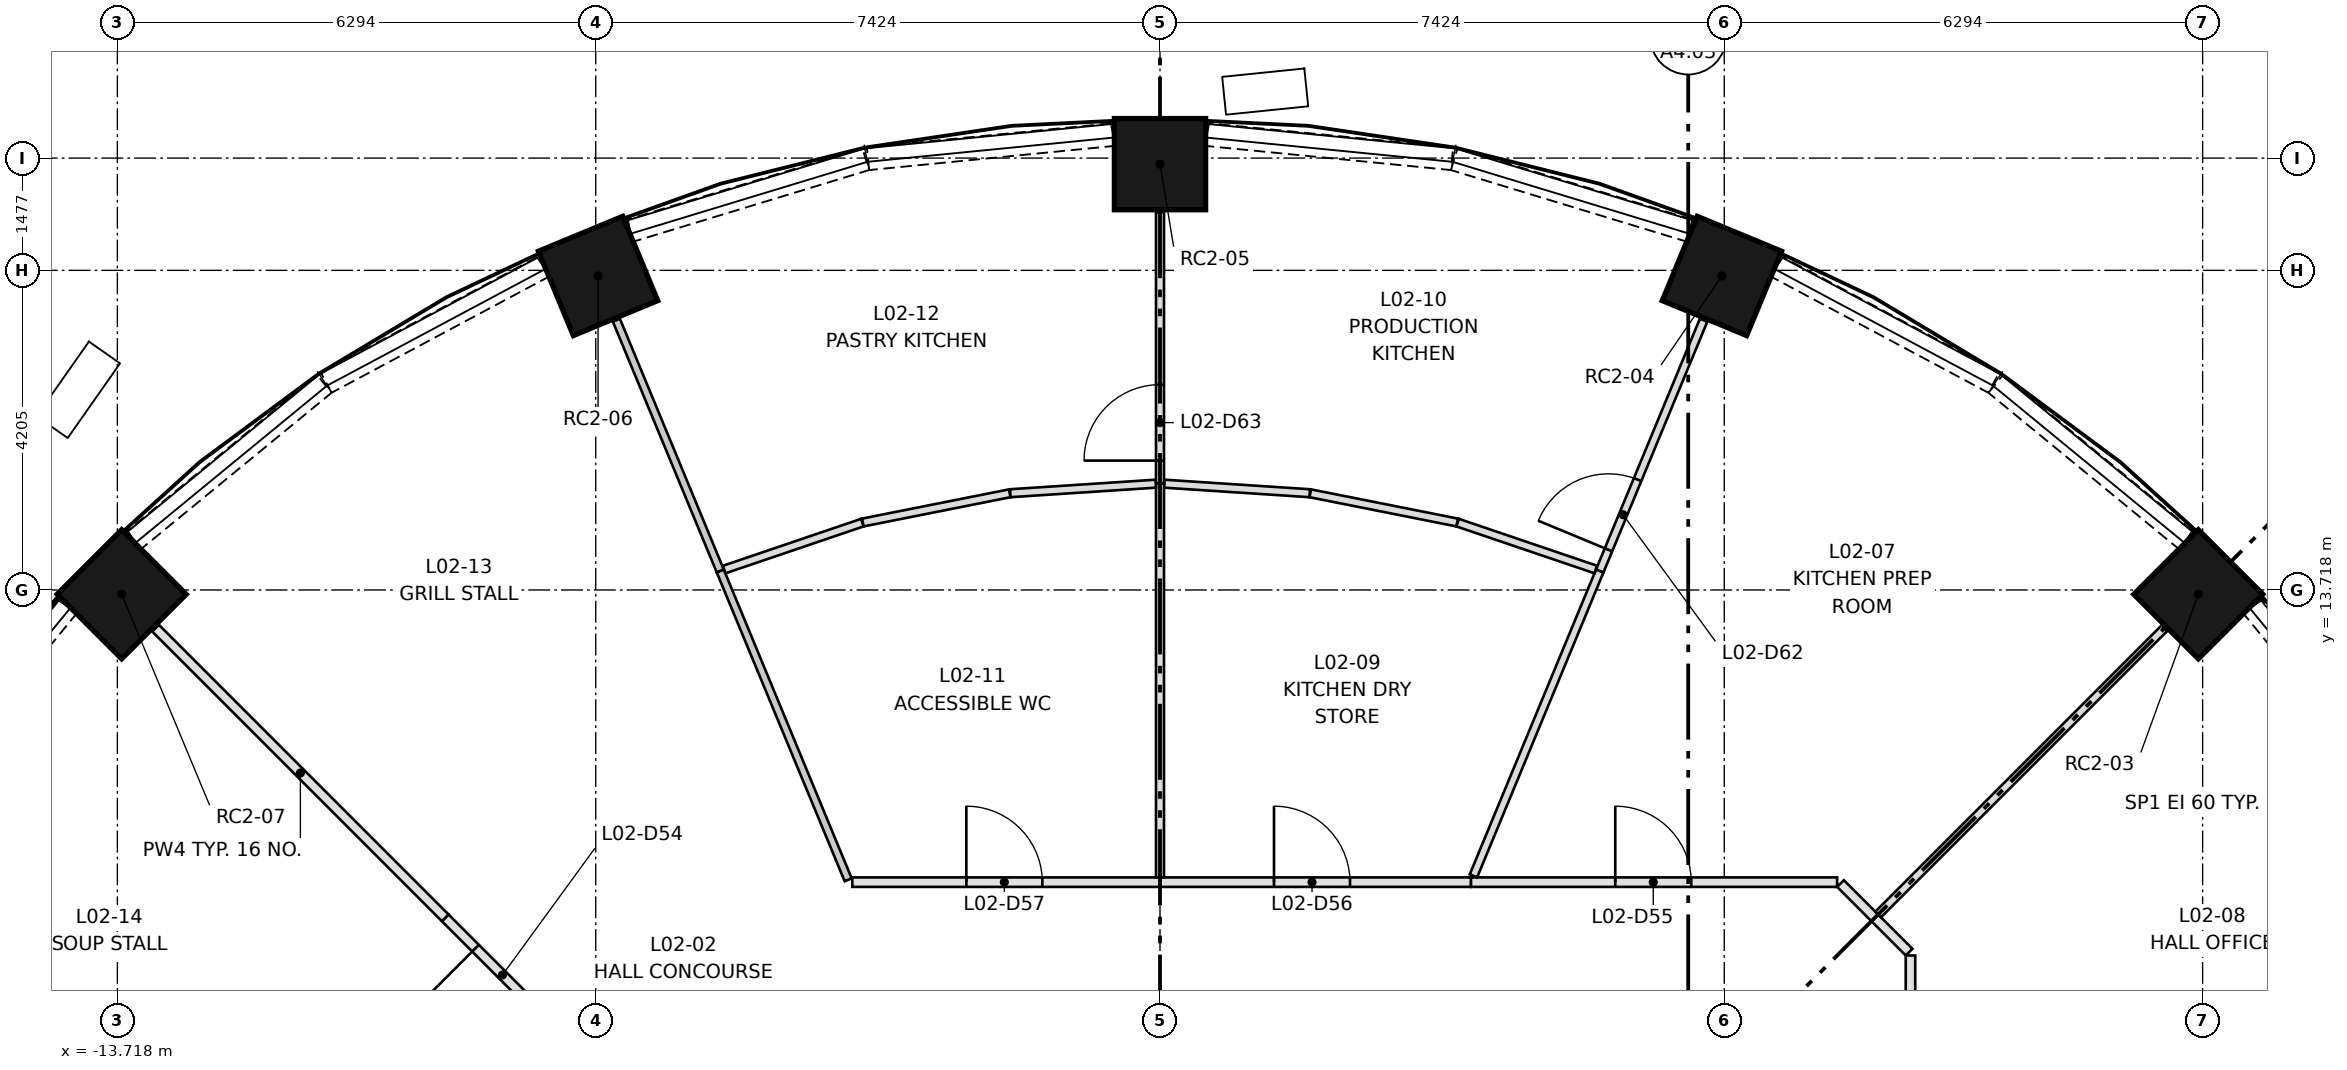
"""IFC4 building model, lengths in metres.
Left out: names, types, materials, properties, quantities, classifications, styles, units other than length and angle.
Written with IfcOpenShell. Run it as: python <this file> out.ifc"""

import sys

from ifc_helpers import new_model, si_unit, direction, frame, frame_2d, origin, origin_2d, place, context, subcontext, project, spatial, rectangle, extrude, element, fill, save


model = new_model("IFC4")
c1 = context("Model", 3, precision=1e-05, world=origin(), true_north=direction((0.0, 1.0)))
c2 = subcontext(c1, "Body", "Model", "MODEL_VIEW")
j1 = project(units=[si_unit("LENGTHUNIT", "METRE"), si_unit("PLANEANGLEUNIT", "RADIAN")], contexts=[c1])
p1 = place(None, origin())
s1 = spatial("IfcSite", under=j1, at=p1, CompositionType="ELEMENT")
p2 = place(p1, origin())
s2 = spatial("IfcBuilding", under=s1, at=p2, CompositionType="ELEMENT")
p3 = place(p2, frame((0.0, 0.0, 9.9)))
s3 = spatial("IfcBuildingStorey", under=s2, at=p3, CompositionType="ELEMENT", Elevation=9.9)
for number, where, z_axis, x_axis in (
    (1, (13.661, 13.661, 0.0), (0.0, 0.0, 1.0), (0.707, 0.707, 0.0)),
    (2, (7.394, 17.849, 0.0), (0.0, 0.0, 1.0), (0.383, 0.924, 0.0)),
    (3, (0.0, 19.32, 0.0), (0.0, 0.0, 1.0), (0.0, 1.0, 0.0)),
    (4, (-7.394, 17.849, 0.0), (0.0, 0.0, 1.0), (-0.383, 0.924, 0.0)),
    (5, (-13.661, 13.661, 0.0), (0.0, 0.0, 1.0), (-0.707, 0.707, 0.0)),
):
    element("IfcColumn", number, at=place(p3, frame(where, z_axis=z_axis, x_axis=x_axis)), inside=s3, PredefinedType="COLUMN", context=c2, shape_type="SweptSolid", body=[
        extrude(rectangle(XDim=1.2, YDim=1.2, at=origin_2d()), origin(), (0.0, 0.0, 1.0), 4.5),
    ])
for number, where, z_axis, x_axis in (
    (6, (16.428, 10.995, 0.0), (0.0, 0.0, 1.0), (-0.634, 0.773, 0.0)),
    (7, (13.503, 14.371, 0.0), (0.0, 0.0, 1.0), (-0.773, 0.634, 0.0)),
):
    element("IfcWall", number, at=place(p3, frame(where, z_axis=z_axis, x_axis=x_axis)), inside=s3, PredefinedType="SOLIDWALL", context=c2, shape_type="SweptSolid", body=[
        extrude(rectangle(XDim=3.245, YDim=0.3, at=frame_2d((1.623, 0.0))), origin(), (0.0, 0.0, 1.0), 0.45),
    ])
p4 = place(p3, frame((10.97, 16.445, 0.0), z_axis=(0.0, 0.0, 1.0), x_axis=(-0.882015257196, 0.471220846392, 0.0)))
e8 = element("IfcWall", 8, at=p4, inside=s3, PredefinedType="SOLIDWALL", context=c2, shape_type="SweptSolid", body=[
    extrude(rectangle(XDim=3.244, YDim=0.3, at=frame_2d((1.622, 0.0))), origin(), (0.0, 0.0, 1.0), 0.45),
])
p5 = place(p3, frame((6.976, 18.443, 0.0), z_axis=(0.0, 0.0, 1.0), x_axis=(-0.95689962518, 0.290418848098, 0.0)))
e9 = element("IfcWall", 9, at=p5, inside=s3, PredefinedType="SOLIDWALL", context=c2, shape_type="SweptSolid", body=[
    extrude(rectangle(XDim=3.244, YDim=0.3, at=frame_2d((1.622, 0.0))), origin(), (0.0, 0.0, 1.0), 0.45),
])
for number, where, z_axis, x_axis in (
    (10, (3.842, 19.392, 0.0), (0.0, 0.0, 1.0), (-0.995, 0.098, 0.0)),
    (11, (-0.613, 19.709, 0.0), (0.0, 0.0, 1.0), (-0.995, -0.098, 0.0)),
):
    element("IfcWall", number, at=place(p3, frame(where, z_axis=z_axis, x_axis=x_axis)), inside=s3, PredefinedType="SOLIDWALL", context=c2, shape_type="SweptSolid", body=[
        extrude(rectangle(XDim=3.245, YDim=0.3, at=frame_2d((1.623, 0.0))), origin(), (0.0, 0.0, 1.0), 0.45),
    ])
p6 = place(p3, frame((-3.871, 19.385, 0.0), z_axis=(0.0, 0.0, 1.0), x_axis=(-0.95689962518, -0.290418848098, 0.0)))
e12 = element("IfcWall", 12, at=p6, inside=s3, PredefinedType="SOLIDWALL", context=c2, shape_type="SweptSolid", body=[
    extrude(rectangle(XDim=3.244, YDim=0.3, at=frame_2d((1.622, 0.0))), origin(), (0.0, 0.0, 1.0), 0.45),
])
p7 = place(p3, frame((-8.108, 17.974, 0.0), z_axis=(0.0, 0.0, 1.0), x_axis=(-0.882015257196, -0.471220846392, 0.0)))
e13 = element("IfcWall", 13, at=p7, inside=s3, PredefinedType="SOLIDWALL", context=c2, shape_type="SweptSolid", body=[
    extrude(rectangle(XDim=3.244, YDim=0.3, at=frame_2d((1.622, 0.0))), origin(), (0.0, 0.0, 1.0), 0.45),
])
for number, where, z_axis, x_axis in (
    (14, (-10.995, 16.428, 0.0), (0.0, 0.0, 1.0), (-0.773, -0.634, 0.0)),
    (15, (-14.371, 13.503, 0.0), (0.0, 0.0, 1.0), (-0.634, -0.773, 0.0)),
):
    element("IfcWall", number, at=place(p3, frame(where, z_axis=z_axis, x_axis=x_axis)), inside=s3, PredefinedType="SOLIDWALL", context=c2, shape_type="SweptSolid", body=[
        extrude(rectangle(XDim=3.245, YDim=0.3, at=frame_2d((1.623, 0.0))), origin(), (0.0, 0.0, 1.0), 0.45),
    ])
p8 = place(p3, frame((9.405, 9.405, 0.0), z_axis=(0.0, 0.0, 1.0), x_axis=(0.707106781187, -0.707106781187, 0.0)))
e16 = element("IfcWall", 16, at=p8, inside=s3, PredefinedType="PARTITIONING", context=c2, shape_type="SweptSolid", body=[
    extrude(rectangle(XDim=0.638, YDim=0.125, at=frame_2d((0.319, 0.0))), origin(), (0.0, 0.0, 1.0), 4.1),
])
p9 = place(p3, frame((9.874, 8.909, 0.0), z_axis=(0.0, 0.0, 1.0), x_axis=(0.0, -1.0, 0.0)))
e17 = element("IfcWall", 17, at=p9, inside=s3, PredefinedType="PARTITIONING", context=c2, shape_type="SweptSolid", body=[
    extrude(rectangle(XDim=4.819, YDim=0.125, at=frame_2d((2.41, 0.0))), origin(), (0.0, 0.0, 1.0), 4.1),
])
p10 = place(p9, frame((1.9, 0.0, 0.0)))
e18 = element("IfcOpeningElement", 18, at=p10, cuts=e17, PredefinedType="OPENING", context=c2, shape_type="SweptSolid", body=[
    extrude(rectangle(XDim=1.0, YDim=2.1, at=frame_2d((0.5, 1.05))), frame((0.0, 0.073, 0.0), z_axis=(0.0, -1.0, 0.0), x_axis=(1.0, 0.0, 0.0)), (0.0, 0.0, 1.0), 0.145),
])
p11 = place(p3, frame((-7.874, 7.874, 0.0), z_axis=(0.0, 0.0, 1.0), x_axis=(-0.707106781187, 0.707106781187, 0.0)))
e19 = element("IfcWall", 19, at=p11, inside=s3, PredefinedType="PARTITIONING", context=c2, shape_type="SweptSolid", body=[
    extrude(rectangle(XDim=2.165, YDim=0.125, at=frame_2d((1.082, 0.0))), origin(), (0.0, 0.0, 1.0), 4.1),
])
p12 = place(p11, frame((0.6, 0.0, 0.0)))
e20 = element("IfcOpeningElement", 20, at=p12, cuts=e19, PredefinedType="OPENING", context=c2, shape_type="SweptSolid", body=[
    extrude(rectangle(XDim=1.0, YDim=2.1, at=frame_2d((0.5, 1.05))), frame((0.0, 0.073, 0.0), z_axis=(0.0, -1.0, 0.0), x_axis=(1.0, 0.0, 0.0)), (0.0, 0.0, 1.0), 0.145),
])
p13 = place(p3, frame((4.09, 9.874, 0.0), z_axis=(0.0, 0.0, 1.0), x_axis=(1.0, 0.0, 0.0)))
e21 = element("IfcWall", 21, at=p13, inside=s3, PredefinedType="PARTITIONING", context=c2, shape_type="SweptSolid", body=[
    extrude(rectangle(XDim=4.819, YDim=0.125, at=frame_2d((2.41, 0.0))), origin(), (0.0, 0.0, 1.0), 4.1),
])
p14 = place(p13, frame((1.9, 0.0, 0.0)))
e22 = element("IfcOpeningElement", 22, at=p14, cuts=e21, PredefinedType="OPENING", context=c2, shape_type="SweptSolid", body=[
    extrude(rectangle(XDim=1.0, YDim=2.1, at=frame_2d((0.5, 1.05))), frame((0.0, 0.073, 0.0), z_axis=(0.0, -1.0, 0.0), x_axis=(1.0, 0.0, 0.0)), (0.0, 0.0, 1.0), 0.145),
])
p15 = place(p3, frame((8.953, 9.856, 0.0), z_axis=(0.0, 0.0, 1.0), x_axis=(0.707106781187, -0.707106781187, 0.0)))
e23 = element("IfcWall", 23, at=p15, inside=s3, PredefinedType="PARTITIONING", context=c2, shape_type="SweptSolid", body=[
    extrude(rectangle(XDim=0.638, YDim=0.125, at=frame_2d((0.319, 0.0))), origin(), (0.0, 0.0, 1.0), 4.1),
])
p16 = place(p3, frame((0.0, 9.874, 0.0), z_axis=(0.0, 0.0, 1.0), x_axis=(1.0, 0.0, 0.0)))
e24 = element("IfcWall", 24, at=p16, inside=s3, PredefinedType="PARTITIONING", context=c2, shape_type="SweptSolid", body=[
    extrude(rectangle(XDim=4.09, YDim=0.125, at=frame_2d((2.045, 0.0))), origin(), (0.0, 0.0, 1.0), 4.1),
])
p17 = place(p16, frame((1.5, 0.0, 0.0)))
e25 = element("IfcOpeningElement", 25, at=p17, cuts=e24, PredefinedType="OPENING", context=c2, shape_type="SweptSolid", body=[
    extrude(rectangle(XDim=1.0, YDim=2.1, at=frame_2d((0.5, 1.05))), frame((0.0, 0.073, 0.0), z_axis=(0.0, -1.0, 0.0), x_axis=(1.0, 0.0, 0.0)), (0.0, 0.0, 1.0), 0.145),
])
p18 = place(p3, frame((-4.048, 9.874, 0.0), z_axis=(0.0, 0.0, 1.0), x_axis=(1.0, 0.0, 0.0)))
e26 = element("IfcWall", 26, at=p18, inside=s3, PredefinedType="PARTITIONING", context=c2, shape_type="SweptSolid", body=[
    extrude(rectangle(XDim=4.048, YDim=0.125, at=frame_2d((2.024, 0.0))), origin(), (0.0, 0.0, 1.0), 4.1),
])
p19 = place(p18, frame((1.5, 0.0, 0.0)))
e27 = element("IfcOpeningElement", 27, at=p19, cuts=e26, PredefinedType="OPENING", context=c2, shape_type="SweptSolid", body=[
    extrude(rectangle(XDim=1.0, YDim=2.1, at=frame_2d((0.5, 1.05))), frame((0.0, 0.073, 0.0), z_axis=(0.0, -1.0, 0.0), x_axis=(1.0, 0.0, 0.0)), (0.0, 0.0, 1.0), 0.145),
])
p20 = place(p3, frame((13.216, 13.216, 0.0), z_axis=(0.0, 0.0, 1.0), x_axis=(-0.707106781187, -0.707106781187, 0.0)))
e28 = element("IfcWall", 28, at=p20, inside=s3, PredefinedType="PARTITIONING", context=c2, shape_type="SweptSolid", body=[
    extrude(rectangle(XDim=5.327, YDim=0.105, at=frame_2d((2.664, 0.0))), origin(), (0.0, 0.0, 1.0), 4.1),
])
p21 = place(p3, frame((4.124, 9.957, 0.0), z_axis=(0.0, 0.0, 1.0), x_axis=(0.382702629741, 0.923871580464, 0.0)))
e29 = element("IfcWall", 29, at=p21, inside=s3, PredefinedType="PARTITIONING", context=c2, shape_type="SweptSolid", body=[
    extrude(rectangle(XDim=4.343, YDim=0.105, at=frame_2d((2.171, 0.0))), origin(), (0.0, 0.0, 1.0), 4.1),
])
p22 = place(p3, frame((5.786, 13.969, 0.0), z_axis=(0.0, 0.0, 1.0), x_axis=(0.382681959822, 0.923880142457, 0.0)))
e30 = element("IfcWall", 30, at=p22, inside=s3, PredefinedType="PARTITIONING", context=c2, shape_type="SweptSolid", body=[
    extrude(rectangle(XDim=3.57, YDim=0.105, at=frame_2d((1.785, 0.0))), origin(), (0.0, 0.0, 1.0), 4.1),
])
p23 = place(p22, frame((0.3, 0.0, 0.0)))
e31 = element("IfcOpeningElement", 31, at=p23, cuts=e30, PredefinedType="OPENING", context=c2, shape_type="SweptSolid", body=[
    extrude(rectangle(XDim=1.0, YDim=2.1, at=frame_2d((0.5, 1.05))), frame((0.0, 0.062, 0.0), z_axis=(0.0, -1.0, 0.0), x_axis=(1.0, 0.0, 0.0)), (0.0, 0.0, 1.0), 0.125),
])
p24 = place(p3, frame((0.056, 15.116, 0.0), z_axis=(0.0, 0.0, 1.0), x_axis=(0.997858311014, -0.06541246931, 0.0)))
e32 = element("IfcWall", 32, at=p24, inside=s3, PredefinedType="PARTITIONING", context=c2, shape_type="SweptSolid", body=[
    extrude(rectangle(XDim=1.918, YDim=0.105, at=frame_2d((0.959, 0.0))), origin(), (0.0, 0.0, 1.0), 4.1),
])
p25 = place(p3, frame((1.977, 14.99, 0.0), z_axis=(0.0, 0.0, 1.0), x_axis=(0.980780283586, -0.195115441032, 0.0)))
e33 = element("IfcWall", 33, at=p25, inside=s3, PredefinedType="PARTITIONING", context=c2, shape_type="SweptSolid", body=[
    extrude(rectangle(XDim=1.971, YDim=0.105, at=frame_2d((0.985, 0.0))), origin(), (0.0, 0.0, 1.0), 4.1),
])
p26 = place(p3, frame((3.917, 14.604, 0.0), z_axis=(0.0, 0.0, 1.0), x_axis=(0.946925447911, -0.321453256474, 0.0)))
e34 = element("IfcWall", 34, at=p26, inside=s3, PredefinedType="PARTITIONING", context=c2, shape_type="SweptSolid", body=[
    extrude(rectangle(XDim=1.918, YDim=0.105, at=frame_2d((0.959, 0.0))), origin(), (0.0, 0.0, 1.0), 4.1),
])
p27 = place(p3, frame((0.0, 9.937, 0.0), z_axis=(0.0, 0.0, 1.0), x_axis=(0.0, 1.0, 0.0)))
e35 = element("IfcWall", 35, at=p27, inside=s3, PredefinedType="PARTITIONING", context=c2, shape_type="SweptSolid", body=[
    extrude(rectangle(XDim=5.184, YDim=0.105, at=frame_2d((2.592, 0.0))), origin(), (0.0, 0.0, 1.0), 4.1),
])
p28 = place(p3, frame((0.0, 15.12, 0.0), z_axis=(0.0, 0.0, 1.0), x_axis=(0.0, 1.0, 0.0)))
e36 = element("IfcWall", 36, at=p28, inside=s3, PredefinedType="PARTITIONING", context=c2, shape_type="SweptSolid", body=[
    extrude(rectangle(XDim=3.57, YDim=0.105, at=frame_2d((1.785, 0.0))), origin(), (0.0, 0.0, 1.0), 4.1),
])
p29 = place(p28, frame((0.3, 0.0, 0.0)))
e37 = element("IfcOpeningElement", 37, at=p29, cuts=e36, PredefinedType="OPENING", context=c2, shape_type="SweptSolid", body=[
    extrude(rectangle(XDim=1.0, YDim=2.1, at=frame_2d((0.5, 1.05))), frame((0.0, 0.062, 0.0), z_axis=(0.0, -1.0, 0.0), x_axis=(1.0, 0.0, 0.0)), (0.0, 0.0, 1.0), 0.125),
])
p30 = place(p3, frame((-5.736, 13.986, 0.0), z_axis=(0.0, 0.0, 1.0), x_axis=(0.94694071598, 0.321408276837, 0.0)))
e38 = element("IfcWall", 38, at=p30, inside=s3, PredefinedType="PARTITIONING", context=c2, shape_type="SweptSolid", body=[
    extrude(rectangle(XDim=1.921, YDim=0.105, at=frame_2d((0.96, 0.0))), origin(), (0.0, 0.0, 1.0), 4.1),
])
p31 = place(p3, frame((-3.91, 14.605, 0.0), z_axis=(0.0, 0.0, 1.0), x_axis=(0.980780283586, 0.195115441032, 0.0)))
e39 = element("IfcWall", 39, at=p31, inside=s3, PredefinedType="PARTITIONING", context=c2, shape_type="SweptSolid", body=[
    extrude(rectangle(XDim=1.971, YDim=0.105, at=frame_2d((0.985, 0.0))), origin(), (0.0, 0.0, 1.0), 4.1),
])
p32 = place(p3, frame((-1.97, 14.991, 0.0), z_axis=(0.0, 0.0, 1.0), x_axis=(0.997858311014, 0.06541246931, 0.0)))
e40 = element("IfcWall", 40, at=p32, inside=s3, PredefinedType="PARTITIONING", context=c2, shape_type="SweptSolid", body=[
    extrude(rectangle(XDim=1.918, YDim=0.105, at=frame_2d((0.959, 0.0))), origin(), (0.0, 0.0, 1.0), 4.1),
])
p33 = place(p3, frame((-4.103, 9.905, 0.0), z_axis=(0.0, 0.0, 1.0), x_axis=(-0.38266385981, 0.923887639486, 0.0)))
e41 = element("IfcWall", 41, at=p33, inside=s3, PredefinedType="PARTITIONING", context=c2, shape_type="SweptSolid", body=[
    extrude(rectangle(XDim=4.399, YDim=0.1, at=frame_2d((2.199, 0.0))), origin(), (0.0, 0.0, 1.0), 4.1),
])
p34 = place(p3, frame((-5.786, 13.969, 0.0), z_axis=(0.0, 0.0, 1.0), x_axis=(-0.382681959822, 0.923880142457, 0.0)))
e42 = element("IfcWall", 42, at=p34, inside=s3, PredefinedType="PARTITIONING", context=c2, shape_type="SweptSolid", body=[
    extrude(rectangle(XDim=3.57, YDim=0.1, at=frame_2d((1.785, 0.0))), origin(), (0.0, 0.0, 1.0), 4.1),
])
p35 = place(p3, frame((-9.405, 9.405, 0.0), z_axis=(0.0, 0.0, 1.0), x_axis=(-0.707106781187, 0.707106781187, 0.0)))
e43 = element("IfcWall", 43, at=p35, inside=s3, PredefinedType="PARTITIONING", context=c2, shape_type="SweptSolid", body=[
    extrude(rectangle(XDim=5.39, YDim=0.125, at=frame_2d((2.695, 0.0))), origin(), (0.0, 0.0, 1.0), 4.1),
])
p36 = place(p12, origin())
e44 = element("IfcDoor", 44, at=p36, inside=s3, OperationType="SINGLE_SWING_RIGHT", PredefinedType="DOOR", context=c2, shape_type="SweptSolid", body=[
    extrude(rectangle(XDim=1.0, YDim=2.1, at=frame_2d((0.5, 1.05))), frame((0.0, 0.025, 0.0), z_axis=(0.0, -1.0, 0.0), x_axis=(1.0, 0.0, 0.0)), (0.0, 0.0, 1.0), 0.05),
])
fill(e20, e44)
p37 = place(p14, origin())
e45 = element("IfcDoor", 45, at=p37, inside=s3, OperationType="SINGLE_SWING_LEFT", PredefinedType="DOOR", context=c2, shape_type="SweptSolid", body=[
    extrude(rectangle(XDim=1.0, YDim=2.1, at=frame_2d((0.5, 1.05))), frame((0.0, 0.025, 0.0), z_axis=(0.0, -1.0, 0.0), x_axis=(1.0, 0.0, 0.0)), (0.0, 0.0, 1.0), 0.05),
])
fill(e22, e45)
p38 = place(p17, origin())
e46 = element("IfcDoor", 46, at=p38, inside=s3, OperationType="SINGLE_SWING_LEFT", PredefinedType="DOOR", context=c2, shape_type="SweptSolid", body=[
    extrude(rectangle(XDim=1.0, YDim=2.1, at=frame_2d((0.5, 1.05))), frame((0.0, 0.025, 0.0), z_axis=(0.0, -1.0, 0.0), x_axis=(1.0, 0.0, 0.0)), (0.0, 0.0, 1.0), 0.05),
])
fill(e25, e46)
p39 = place(p19, origin())
e47 = element("IfcDoor", 47, at=p39, inside=s3, OperationType="SINGLE_SWING_LEFT", PredefinedType="DOOR", context=c2, shape_type="SweptSolid", body=[
    extrude(rectangle(XDim=1.0, YDim=2.1, at=frame_2d((0.5, 1.05))), frame((0.0, 0.025, 0.0), z_axis=(0.0, -1.0, 0.0), x_axis=(1.0, 0.0, 0.0)), (0.0, 0.0, 1.0), 0.05),
])
fill(e27, e47)
p40 = place(p23, origin())
e48 = element("IfcDoor", 48, at=p40, inside=s3, OperationType="SINGLE_SWING_LEFT", PredefinedType="DOOR", context=c2, shape_type="SweptSolid", body=[
    extrude(rectangle(XDim=1.0, YDim=2.1, at=frame_2d((0.5, 1.05))), frame((0.0, 0.025, 0.0), z_axis=(0.0, -1.0, 0.0), x_axis=(1.0, 0.0, 0.0)), (0.0, 0.0, 1.0), 0.05),
])
fill(e31, e48)
p41 = place(p29, origin())
e49 = element("IfcDoor", 49, at=p41, inside=s3, OperationType="SINGLE_SWING_LEFT", PredefinedType="DOOR", context=c2, shape_type="SweptSolid", body=[
    extrude(rectangle(XDim=1.0, YDim=2.1, at=frame_2d((0.5, 1.05))), frame((0.0, 0.025, 0.0), z_axis=(0.0, -1.0, 0.0), x_axis=(1.0, 0.0, 0.0)), (0.0, 0.0, 1.0), 0.05),
])
fill(e37, e49)
save(model, sys.argv[1])
